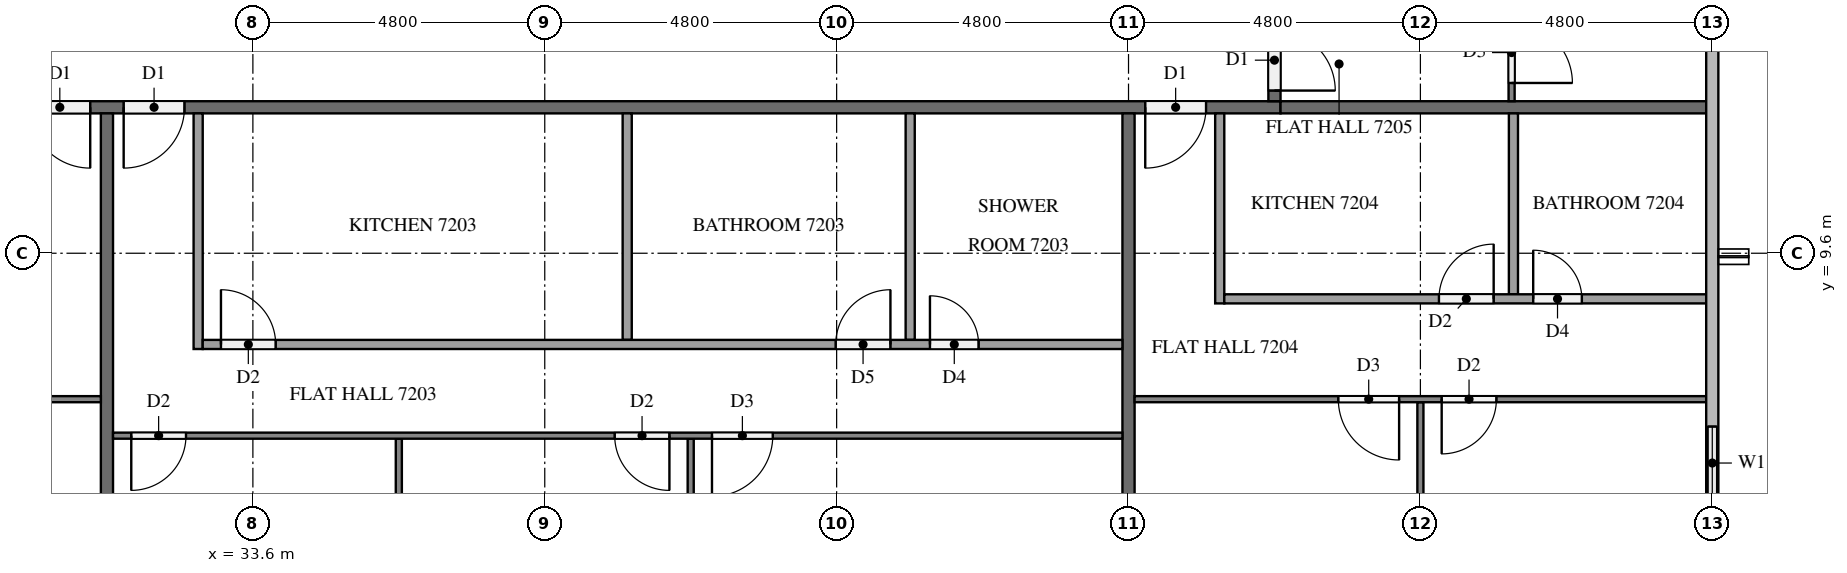
"""IFC4 building model, lengths in metres.
Left out: names, types, materials, properties, quantities, classifications, styles, units other than length and angle.
Written with IfcOpenShell. Run it as: python <this file> out.ifc"""

import sys

from ifc_helpers import new_model, si_unit, direction, frame, frame_2d, origin, place, context, subcontext, project, spatial, rectangle, extrude, element, fill, save


model = new_model("IFC4")
c1 = context("Model", 3, precision=1e-05, world=origin(), true_north=direction((0.0, 1.0)))
c2 = subcontext(c1, "Body", "Model", "MODEL_VIEW")
j1 = project(units=[si_unit("LENGTHUNIT", "METRE"), si_unit("PLANEANGLEUNIT", "RADIAN")], contexts=[c1])
p1 = place(None, origin())
s1 = spatial("IfcSite", under=j1, at=p1, CompositionType="ELEMENT")
p2 = place(p1, origin())
s2 = spatial("IfcBuilding", under=s1, at=p2, CompositionType="ELEMENT")
p3 = place(p2, frame((0.0, 0.0, 275.6)))
s3 = spatial("IfcBuildingStorey", under=s2, at=p3, CompositionType="ELEMENT", Elevation=275.6)
p4 = place(p3, frame((57.6, 5.1, 0.0), z_axis=(0.0, 0.0, 1.0), x_axis=(0.0, 1.0, 0.0)))
e1 = element("IfcWall", 1, at=p4, inside=s3, PredefinedType="SOLIDWALL", context=c2, shape_type="SweptSolid", body=[
    extrude(rectangle(XDim=2.1, YDim=0.15, at=frame_2d((1.05, 0.0))), origin(), (0.0, 0.0, 1.0), 3.2),
])
p5 = place(p4, frame((0.45, 0.0, 0.9)))
e2 = element("IfcOpeningElement", 2, at=p5, cuts=e1, PredefinedType="OPENING", context=c2, shape_type="SweptSolid", body=[
    extrude(rectangle(XDim=1.2, YDim=1.4, at=frame_2d((0.6, 0.7))), frame((0.0, 0.085, 0.0), z_axis=(0.0, -1.0, 0.0), x_axis=(1.0, 0.0, 0.0)), (0.0, 0.0, 1.0), 0.17),
])
p6 = place(p3, frame((50.5, 12.0, 0.0), z_axis=(0.0, 0.0, 1.0), x_axis=(-1.0, 0.0, 0.0)))
e3 = element("IfcWall", 3, at=p6, inside=s3, PredefinedType="PARTITIONING", context=c2, shape_type="SweptSolid", body=[
    extrude(rectangle(XDim=38.6, YDim=0.2, at=frame_2d((19.3, 0.0))), origin(), (0.0, 0.0, 1.0), 3.2),
])
p7 = place(p6, frame((31.525, 0.0, 0.0)))
e4 = element("IfcOpeningElement", 4, at=p7, cuts=e3, PredefinedType="OPENING", context=c2, shape_type="SweptSolid", body=[
    extrude(rectangle(XDim=1.1, YDim=2.1, at=frame_2d((0.55, 1.05))), frame((0.0, 0.11, 0.0), z_axis=(0.0, -1.0, 0.0), x_axis=(1.0, 0.0, 0.0)), (0.0, 0.0, 1.0), 0.22),
])
p8 = place(p6, frame((19.575, 0.0, 0.0)))
e5 = element("IfcOpeningElement", 5, at=p8, cuts=e3, PredefinedType="OPENING", context=c2, shape_type="SweptSolid", body=[
    extrude(rectangle(XDim=1.0, YDim=2.1, at=frame_2d((0.5, 1.05))), frame((0.0, 0.11, 0.0), z_axis=(0.0, -1.0, 0.0), x_axis=(1.0, 0.0, 0.0)), (0.0, 0.0, 1.0), 0.22),
])
p9 = place(p6, frame((18.025, 0.0, 0.0)))
e6 = element("IfcOpeningElement", 6, at=p9, cuts=e3, PredefinedType="OPENING", context=c2, shape_type="SweptSolid", body=[
    extrude(rectangle(XDim=1.0, YDim=2.1, at=frame_2d((0.5, 1.05))), frame((0.0, 0.11, 0.0), z_axis=(0.0, -1.0, 0.0), x_axis=(1.0, 0.0, 0.0)), (0.0, 0.0, 1.0), 0.22),
])
p10 = place(p6, frame((1.225, 0.0, 0.0)))
e7 = element("IfcOpeningElement", 7, at=p10, cuts=e3, PredefinedType="OPENING", context=c2, shape_type="SweptSolid", body=[
    extrude(rectangle(XDim=1.0, YDim=2.1, at=frame_2d((0.5, 1.05))), frame((0.0, 0.11, 0.0), z_axis=(0.0, -1.0, 0.0), x_axis=(1.0, 0.0, 0.0)), (0.0, 0.0, 1.0), 0.22),
])
p11 = place(p3, frame((50.4, 40.7, 0.0), z_axis=(0.0, 0.0, 1.0), x_axis=(0.0, -1.0, 0.0)))
e8 = element("IfcWall", 8, at=p11, inside=s3, PredefinedType="PARTITIONING", context=c2, shape_type="SweptSolid", body=[
    extrude(rectangle(XDim=28.6, YDim=0.2, at=frame_2d((14.3, 0.0))), origin(), (0.0, 0.0, 1.0), 3.2),
])
p12 = place(p11, frame((27.425, 0.0, 0.0)))
e9 = element("IfcOpeningElement", 9, at=p12, cuts=e8, PredefinedType="OPENING", context=c2, shape_type="SweptSolid", body=[
    extrude(rectangle(XDim=1.0, YDim=2.1, at=frame_2d((0.5, 1.05))), frame((0.0, 0.11, 0.0), z_axis=(0.0, -1.0, 0.0), x_axis=(1.0, 0.0, 0.0)), (0.0, 0.0, 1.0), 0.22),
])
p13 = place(p11, frame((0.175, 0.0, 0.0)))
e10 = element("IfcOpeningElement", 10, at=p13, cuts=e8, PredefinedType="OPENING", context=c2, shape_type="SweptSolid", body=[
    extrude(rectangle(XDim=1.0, YDim=2.1, at=frame_2d((0.5, 1.05))), frame((0.0, 0.11, 0.0), z_axis=(0.0, -1.0, 0.0), x_axis=(1.0, 0.0, 0.0)), (0.0, 0.0, 1.0), 0.22),
])
for number, where, z_axis, x_axis in (
    (11, (31.2, 11.9, 0.0), (0.0, 0.0, 1.0), (0.0, -1.0, 0.0)),
    (12, (48.0, 11.9, 0.0), (0.0, 0.0, 1.0), (0.0, -1.0, 0.0)),
):
    element("IfcWall", number, at=place(p3, frame(where, z_axis=z_axis, x_axis=x_axis)), inside=s3, PredefinedType="PARTITIONING", context=c2, shape_type="SweptSolid", body=[
        extrude(rectangle(XDim=11.8, YDim=0.2, at=frame_2d((5.9, 0.0))), origin(), (0.0, 0.0, 1.0), 3.2),
    ])
p14 = place(p3, frame((50.5, 12.0, 0.0), z_axis=(0.0, 0.0, 1.0), x_axis=(1.0, 0.0, 0.0)))
e13 = element("IfcWall", 13, at=p14, inside=s3, PredefinedType="PARTITIONING", context=c2, shape_type="SweptSolid", body=[
    extrude(rectangle(XDim=7.0, YDim=0.2, at=frame_2d((3.5, 0.0))), origin(), (0.0, 0.0, 1.0), 3.2),
])
p15 = place(p3, frame((31.1, 7.2, 0.0), z_axis=(0.0, 0.0, 1.0), x_axis=(-1.0, 0.0, 0.0)))
e14 = element("IfcWall", 14, at=p15, inside=s3, PredefinedType="PARTITIONING", context=c2, shape_type="SweptSolid", body=[
    extrude(rectangle(XDim=11.8, YDim=0.1, at=frame_2d((5.9, 0.0))), origin(), (0.0, 0.0, 1.0), 3.2),
])
p16 = place(p15, frame((3.45, 0.0, 0.0)))
e15 = element("IfcOpeningElement", 15, at=p16, cuts=e14, PredefinedType="OPENING", context=c2, shape_type="SweptSolid", body=[
    extrude(rectangle(XDim=0.9, YDim=2.1, at=frame_2d((0.45, 1.05))), frame((0.0, 0.06, 0.0), z_axis=(0.0, -1.0, 0.0), x_axis=(1.0, 0.0, 0.0)), (0.0, 0.0, 1.0), 0.12),
])
p17 = place(p15, frame((5.05, 0.0, 0.0)))
e16 = element("IfcOpeningElement", 16, at=p17, cuts=e14, PredefinedType="OPENING", context=c2, shape_type="SweptSolid", body=[
    extrude(rectangle(XDim=1.0, YDim=2.1, at=frame_2d((0.5, 1.05))), frame((0.0, 0.06, 0.0), z_axis=(0.0, -1.0, 0.0), x_axis=(1.0, 0.0, 0.0)), (0.0, 0.0, 1.0), 0.12),
])
for number, where, z_axis, x_axis in (
    (17, (36.0, 6.55, 0.0), (0.0, 0.0, 1.0), (0.0, -1.0, 0.0)),
    (18, (40.8, 6.55, 0.0), (0.0, 0.0, 1.0), (0.0, -1.0, 0.0)),
):
    element("IfcWall", number, at=place(p3, frame(where, z_axis=z_axis, x_axis=x_axis)), inside=s3, PredefinedType="PARTITIONING", context=c2, shape_type="SweptSolid", body=[
        extrude(rectangle(XDim=6.45, YDim=0.1, at=frame_2d((3.225, 0.0))), origin(), (0.0, 0.0, 1.0), 3.2),
    ])
p18 = place(p3, frame((47.9, 6.6, 0.0), z_axis=(0.0, 0.0, 1.0), x_axis=(-1.0, 0.0, 0.0)))
e19 = element("IfcWall", 19, at=p18, inside=s3, PredefinedType="PARTITIONING", context=c2, shape_type="SweptSolid", body=[
    extrude(rectangle(XDim=16.6, YDim=0.1, at=frame_2d((8.3, 0.0))), origin(), (0.0, 0.0, 1.0), 3.2),
])
p19 = place(p18, frame((15.4, 0.0, 0.0)))
e20 = element("IfcOpeningElement", 20, at=p19, cuts=e19, PredefinedType="OPENING", context=c2, shape_type="SweptSolid", body=[
    extrude(rectangle(XDim=0.9, YDim=2.1, at=frame_2d((0.45, 1.05))), frame((0.0, 0.06, 0.0), z_axis=(0.0, -1.0, 0.0), x_axis=(1.0, 0.0, 0.0)), (0.0, 0.0, 1.0), 0.12),
])
p20 = place(p18, frame((7.45, 0.0, 0.0)))
e21 = element("IfcOpeningElement", 21, at=p20, cuts=e19, PredefinedType="OPENING", context=c2, shape_type="SweptSolid", body=[
    extrude(rectangle(XDim=0.9, YDim=2.1, at=frame_2d((0.45, 1.05))), frame((0.0, 0.06, 0.0), z_axis=(0.0, -1.0, 0.0), x_axis=(1.0, 0.0, 0.0)), (0.0, 0.0, 1.0), 0.12),
])
p21 = place(p18, frame((5.75, 0.0, 0.0)))
e22 = element("IfcOpeningElement", 22, at=p21, cuts=e19, PredefinedType="OPENING", context=c2, shape_type="SweptSolid", body=[
    extrude(rectangle(XDim=1.0, YDim=2.1, at=frame_2d((0.5, 1.05))), frame((0.0, 0.06, 0.0), z_axis=(0.0, -1.0, 0.0), x_axis=(1.0, 0.0, 0.0)), (0.0, 0.0, 1.0), 0.12),
])
for number, where, z_axis, x_axis in (
    (23, (39.756, 11.9, 0.0), (0.0, 0.0, 1.0), (0.0, -1.0, 0.0)),
    (24, (44.41, 11.9, 0.0), (0.0, 0.0, 1.0), (0.0, -1.0, 0.0)),
):
    element("IfcWall", number, at=place(p3, frame(where, z_axis=z_axis, x_axis=x_axis)), inside=s3, PredefinedType="PARTITIONING", context=c2, shape_type="SweptSolid", body=[
        extrude(rectangle(XDim=3.725, YDim=0.15, at=frame_2d((1.862, 0.0))), origin(), (0.0, 0.0, 1.0), 3.2),
    ])
p22 = place(p3, frame((32.7, 11.9, 0.0), z_axis=(0.0, 0.0, 1.0), x_axis=(0.0, -1.0, 0.0)))
e25 = element("IfcWall", 25, at=p22, inside=s3, PredefinedType="PARTITIONING", context=c2, shape_type="SweptSolid", body=[
    extrude(rectangle(XDim=3.875, YDim=0.15, at=frame_2d((1.938, 0.0))), origin(), (0.0, 0.0, 1.0), 3.2),
])
p23 = place(p3, frame((32.775, 8.1, 0.0), z_axis=(0.0, 0.0, 1.0), x_axis=(1.0, 0.0, 0.0)))
e26 = element("IfcWall", 26, at=p23, inside=s3, PredefinedType="PARTITIONING", context=c2, shape_type="SweptSolid", body=[
    extrude(rectangle(XDim=15.125, YDim=0.15, at=frame_2d((7.562, 0.0))), origin(), (0.0, 0.0, 1.0), 3.2),
])
p24 = place(p23, frame((0.3, 0.0, 0.0)))
e27 = element("IfcOpeningElement", 27, at=p24, cuts=e26, PredefinedType="OPENING", context=c2, shape_type="SweptSolid", body=[
    extrude(rectangle(XDim=0.9, YDim=2.1, at=frame_2d((0.45, 1.05))), frame((0.0, 0.085, 0.0), z_axis=(0.0, -1.0, 0.0), x_axis=(1.0, 0.0, 0.0)), (0.0, 0.0, 1.0), 0.17),
])
p25 = place(p23, frame((10.41, 0.0, 0.0)))
e28 = element("IfcOpeningElement", 28, at=p25, cuts=e26, PredefinedType="OPENING", context=c2, shape_type="SweptSolid", body=[
    extrude(rectangle(XDim=0.9, YDim=2.1, at=frame_2d((0.45, 1.05))), frame((0.0, 0.085, 0.0), z_axis=(0.0, -1.0, 0.0), x_axis=(1.0, 0.0, 0.0)), (0.0, 0.0, 1.0), 0.17),
])
p26 = place(p23, frame((11.96, 0.0, 0.0)))
e29 = element("IfcOpeningElement", 29, at=p26, cuts=e26, PredefinedType="OPENING", context=c2, shape_type="SweptSolid", body=[
    extrude(rectangle(XDim=0.8, YDim=2.1, at=frame_2d((0.4, 1.05))), frame((0.0, 0.085, 0.0), z_axis=(0.0, -1.0, 0.0), x_axis=(1.0, 0.0, 0.0)), (0.0, 0.0, 1.0), 0.17),
])
p27 = place(p3, frame((52.8, 7.15, 0.0), z_axis=(0.0, 0.0, 1.0), x_axis=(0.0, -1.0, 0.0)))
e30 = element("IfcWall", 30, at=p27, inside=s3, PredefinedType="PARTITIONING", context=c2, shape_type="SweptSolid", body=[
    extrude(rectangle(XDim=6.85, YDim=0.1, at=frame_2d((3.425, 0.0))), origin(), (0.0, 0.0, 1.0), 3.2),
])
p28 = place(p3, frame((57.5, 7.2, 0.0), z_axis=(0.0, 0.0, 1.0), x_axis=(-1.0, 0.0, 0.0)))
e31 = element("IfcWall", 31, at=p28, inside=s3, PredefinedType="PARTITIONING", context=c2, shape_type="SweptSolid", body=[
    extrude(rectangle(XDim=9.4, YDim=0.1, at=frame_2d((4.7, 0.0))), origin(), (0.0, 0.0, 1.0), 3.2),
])
p29 = place(p28, frame((5.05, 0.0, 0.0)))
e32 = element("IfcOpeningElement", 32, at=p29, cuts=e31, PredefinedType="OPENING", context=c2, shape_type="SweptSolid", body=[
    extrude(rectangle(XDim=1.0, YDim=2.1, at=frame_2d((0.5, 1.05))), frame((0.0, 0.06, 0.0), z_axis=(0.0, -1.0, 0.0), x_axis=(1.0, 0.0, 0.0)), (0.0, 0.0, 1.0), 0.12),
])
p30 = place(p28, frame((3.45, 0.0, 0.0)))
e33 = element("IfcOpeningElement", 33, at=p30, cuts=e31, PredefinedType="OPENING", context=c2, shape_type="SweptSolid", body=[
    extrude(rectangle(XDim=0.9, YDim=2.1, at=frame_2d((0.45, 1.05))), frame((0.0, 0.06, 0.0), z_axis=(0.0, -1.0, 0.0), x_axis=(1.0, 0.0, 0.0)), (0.0, 0.0, 1.0), 0.12),
])
p31 = place(p3, frame((54.33, 11.9, 0.0), z_axis=(0.0, 0.0, 1.0), x_axis=(0.0, -1.0, 0.0)))
e34 = element("IfcWall", 34, at=p31, inside=s3, PredefinedType="PARTITIONING", context=c2, shape_type="SweptSolid", body=[
    extrude(rectangle(XDim=2.975, YDim=0.15, at=frame_2d((1.487, 0.0))), origin(), (0.0, 0.0, 1.0), 3.2),
])
p32 = place(p3, frame((49.5, 11.9, 0.0), z_axis=(0.0, 0.0, 1.0), x_axis=(0.0, -1.0, 0.0)))
e35 = element("IfcWall", 35, at=p32, inside=s3, PredefinedType="PARTITIONING", context=c2, shape_type="SweptSolid", body=[
    extrude(rectangle(XDim=3.125, YDim=0.15, at=frame_2d((1.562, 0.0))), origin(), (0.0, 0.0, 1.0), 3.2),
])
p33 = place(p3, frame((49.575, 8.85, 0.0), z_axis=(0.0, 0.0, 1.0), x_axis=(1.0, 0.0, 0.0)))
e36 = element("IfcWall", 36, at=p33, inside=s3, PredefinedType="PARTITIONING", context=c2, shape_type="SweptSolid", body=[
    extrude(rectangle(XDim=7.925, YDim=0.15, at=frame_2d((3.962, 0.0))), origin(), (0.0, 0.0, 1.0), 3.2),
])
p34 = place(p33, frame((3.53, 0.0, 0.0)))
e37 = element("IfcOpeningElement", 37, at=p34, cuts=e36, PredefinedType="OPENING", context=c2, shape_type="SweptSolid", body=[
    extrude(rectangle(XDim=0.9, YDim=2.1, at=frame_2d((0.45, 1.05))), frame((0.0, 0.085, 0.0), z_axis=(0.0, -1.0, 0.0), x_axis=(1.0, 0.0, 0.0)), (0.0, 0.0, 1.0), 0.17),
])
p35 = place(p33, frame((5.08, 0.0, 0.0)))
e38 = element("IfcOpeningElement", 38, at=p35, cuts=e36, PredefinedType="OPENING", context=c2, shape_type="SweptSolid", body=[
    extrude(rectangle(XDim=0.8, YDim=2.1, at=frame_2d((0.4, 1.05))), frame((0.0, 0.085, 0.0), z_axis=(0.0, -1.0, 0.0), x_axis=(1.0, 0.0, 0.0)), (0.0, 0.0, 1.0), 0.17),
])
p36 = place(p3, frame((54.3, 28.7, 0.0), z_axis=(0.0, 0.0, 1.0), x_axis=(0.0, -1.0, 0.0)))
e39 = element("IfcWall", 39, at=p36, inside=s3, PredefinedType="PARTITIONING", context=c2, shape_type="SweptSolid", body=[
    extrude(rectangle(XDim=16.6, YDim=0.1, at=frame_2d((8.3, 0.0))), origin(), (0.0, 0.0, 1.0), 3.2),
])
p37 = place(p36, frame((15.3, 0.0, 0.0)))
e40 = element("IfcOpeningElement", 40, at=p37, cuts=e39, PredefinedType="OPENING", context=c2, shape_type="SweptSolid", body=[
    extrude(rectangle(XDim=1.0, YDim=2.1, at=frame_2d((0.5, 1.05))), frame((0.0, 0.06, 0.0), z_axis=(0.0, -1.0, 0.0), x_axis=(1.0, 0.0, 0.0)), (0.0, 0.0, 1.0), 0.12),
])
p38 = place(p36, frame((5.05, 0.0, 0.0)))
e41 = element("IfcOpeningElement", 41, at=p38, cuts=e39, PredefinedType="OPENING", context=c2, shape_type="SweptSolid", body=[
    extrude(rectangle(XDim=0.9, YDim=2.1, at=frame_2d((0.45, 1.05))), frame((0.0, 0.06, 0.0), z_axis=(0.0, -1.0, 0.0), x_axis=(1.0, 0.0, 0.0)), (0.0, 0.0, 1.0), 0.12),
])
p39 = place(p36, frame((3.45, 0.0, 0.0)))
e42 = element("IfcOpeningElement", 42, at=p39, cuts=e39, PredefinedType="OPENING", context=c2, shape_type="SweptSolid", body=[
    extrude(rectangle(XDim=0.9, YDim=2.1, at=frame_2d((0.45, 1.05))), frame((0.0, 0.06, 0.0), z_axis=(0.0, -1.0, 0.0), x_axis=(1.0, 0.0, 0.0)), (0.0, 0.0, 1.0), 0.12),
])
p40 = place(p5, origin())
e43 = element("IfcWindow", 43, at=p40, inside=s3, PartitioningType="SINGLE_PANEL", PredefinedType="WINDOW", context=c2, shape_type="SweptSolid", body=[
    extrude(rectangle(XDim=1.2, YDim=1.4, at=frame_2d((0.6, 0.7))), frame((0.0, 0.03, 0.0), z_axis=(0.0, -1.0, 0.0), x_axis=(1.0, 0.0, 0.0)), (0.0, 0.0, 1.0), 0.06),
])
fill(e2, e43)
p41 = place(p8, origin())
e44 = element("IfcDoor", 44, at=p41, inside=s3, OperationType="SINGLE_SWING_LEFT", PredefinedType="DOOR", context=c2, shape_type="SweptSolid", body=[
    extrude(rectangle(XDim=1.0, YDim=2.1, at=frame_2d((0.5, 1.05))), frame((0.0, 0.025, 0.0), z_axis=(0.0, -1.0, 0.0), x_axis=(1.0, 0.0, 0.0)), (0.0, 0.0, 1.0), 0.05),
])
fill(e5, e44)
p42 = place(p9, origin())
e45 = element("IfcDoor", 45, at=p42, inside=s3, OperationType="SINGLE_SWING_RIGHT", PredefinedType="DOOR", context=c2, shape_type="SweptSolid", body=[
    extrude(rectangle(XDim=1.0, YDim=2.1, at=frame_2d((0.5, 1.05))), frame((0.0, 0.025, 0.0), z_axis=(0.0, -1.0, 0.0), x_axis=(1.0, 0.0, 0.0)), (0.0, 0.0, 1.0), 0.05),
])
fill(e6, e45)
p43 = place(p10, origin())
e46 = element("IfcDoor", 46, at=p43, inside=s3, OperationType="SINGLE_SWING_RIGHT", PredefinedType="DOOR", context=c2, shape_type="SweptSolid", body=[
    extrude(rectangle(XDim=1.0, YDim=2.1, at=frame_2d((0.5, 1.05))), frame((0.0, 0.025, 0.0), z_axis=(0.0, -1.0, 0.0), x_axis=(1.0, 0.0, 0.0)), (0.0, 0.0, 1.0), 0.05),
])
fill(e7, e46)
p44 = place(p12, origin())
e47 = element("IfcDoor", 47, at=p44, inside=s3, OperationType="SINGLE_SWING_RIGHT", PredefinedType="DOOR", context=c2, shape_type="SweptSolid", body=[
    extrude(rectangle(XDim=1.0, YDim=2.1, at=frame_2d((0.5, 1.05))), frame((0.0, 0.025, 0.0), z_axis=(0.0, -1.0, 0.0), x_axis=(1.0, 0.0, 0.0)), (0.0, 0.0, 1.0), 0.05),
])
fill(e9, e47)
p45 = place(p19, origin())
e48 = element("IfcDoor", 48, at=p45, inside=s3, OperationType="SINGLE_SWING_RIGHT", PredefinedType="DOOR", context=c2, shape_type="SweptSolid", body=[
    extrude(rectangle(XDim=0.9, YDim=2.1, at=frame_2d((0.45, 1.05))), frame((0.0, 0.025, 0.0), z_axis=(0.0, -1.0, 0.0), x_axis=(1.0, 0.0, 0.0)), (0.0, 0.0, 1.0), 0.05),
])
fill(e20, e48)
p46 = place(p20, origin())
e49 = element("IfcDoor", 49, at=p46, inside=s3, OperationType="SINGLE_SWING_LEFT", PredefinedType="DOOR", context=c2, shape_type="SweptSolid", body=[
    extrude(rectangle(XDim=0.9, YDim=2.1, at=frame_2d((0.45, 1.05))), frame((0.0, 0.025, 0.0), z_axis=(0.0, -1.0, 0.0), x_axis=(1.0, 0.0, 0.0)), (0.0, 0.0, 1.0), 0.05),
])
fill(e21, e49)
p47 = place(p21, origin())
e50 = element("IfcDoor", 50, at=p47, inside=s3, OperationType="SINGLE_SWING_RIGHT", PredefinedType="DOOR", context=c2, shape_type="SweptSolid", body=[
    extrude(rectangle(XDim=1.0, YDim=2.1, at=frame_2d((0.5, 1.05))), frame((0.0, 0.025, 0.0), z_axis=(0.0, -1.0, 0.0), x_axis=(1.0, 0.0, 0.0)), (0.0, 0.0, 1.0), 0.05),
])
fill(e22, e50)
p48 = place(p24, origin())
e51 = element("IfcDoor", 51, at=p48, inside=s3, OperationType="SINGLE_SWING_LEFT", PredefinedType="DOOR", context=c2, shape_type="SweptSolid", body=[
    extrude(rectangle(XDim=0.9, YDim=2.1, at=frame_2d((0.45, 1.05))), frame((0.0, 0.025, 0.0), z_axis=(0.0, -1.0, 0.0), x_axis=(1.0, 0.0, 0.0)), (0.0, 0.0, 1.0), 0.05),
])
fill(e27, e51)
p49 = place(p25, origin())
e52 = element("IfcDoor", 52, at=p49, inside=s3, OperationType="SINGLE_SWING_RIGHT", PredefinedType="DOOR", context=c2, shape_type="SweptSolid", body=[
    extrude(rectangle(XDim=0.9, YDim=2.1, at=frame_2d((0.45, 1.05))), frame((0.0, 0.025, 0.0), z_axis=(0.0, -1.0, 0.0), x_axis=(1.0, 0.0, 0.0)), (0.0, 0.0, 1.0), 0.05),
])
fill(e28, e52)
p50 = place(p26, origin())
e53 = element("IfcDoor", 53, at=p50, inside=s3, OperationType="SINGLE_SWING_LEFT", PredefinedType="DOOR", context=c2, shape_type="SweptSolid", body=[
    extrude(rectangle(XDim=0.8, YDim=2.1, at=frame_2d((0.4, 1.05))), frame((0.0, 0.025, 0.0), z_axis=(0.0, -1.0, 0.0), x_axis=(1.0, 0.0, 0.0)), (0.0, 0.0, 1.0), 0.05),
])
fill(e29, e53)
p51 = place(p29, origin())
e54 = element("IfcDoor", 54, at=p51, inside=s3, OperationType="SINGLE_SWING_LEFT", PredefinedType="DOOR", context=c2, shape_type="SweptSolid", body=[
    extrude(rectangle(XDim=1.0, YDim=2.1, at=frame_2d((0.5, 1.05))), frame((0.0, 0.025, 0.0), z_axis=(0.0, -1.0, 0.0), x_axis=(1.0, 0.0, 0.0)), (0.0, 0.0, 1.0), 0.05),
])
fill(e32, e54)
p52 = place(p30, origin())
e55 = element("IfcDoor", 55, at=p52, inside=s3, OperationType="SINGLE_SWING_RIGHT", PredefinedType="DOOR", context=c2, shape_type="SweptSolid", body=[
    extrude(rectangle(XDim=0.9, YDim=2.1, at=frame_2d((0.45, 1.05))), frame((0.0, 0.025, 0.0), z_axis=(0.0, -1.0, 0.0), x_axis=(1.0, 0.0, 0.0)), (0.0, 0.0, 1.0), 0.05),
])
fill(e33, e55)
p53 = place(p34, origin())
e56 = element("IfcDoor", 56, at=p53, inside=s3, OperationType="SINGLE_SWING_RIGHT", PredefinedType="DOOR", context=c2, shape_type="SweptSolid", body=[
    extrude(rectangle(XDim=0.9, YDim=2.1, at=frame_2d((0.45, 1.05))), frame((0.0, 0.025, 0.0), z_axis=(0.0, -1.0, 0.0), x_axis=(1.0, 0.0, 0.0)), (0.0, 0.0, 1.0), 0.05),
])
fill(e37, e56)
p54 = place(p35, origin())
e57 = element("IfcDoor", 57, at=p54, inside=s3, OperationType="SINGLE_SWING_LEFT", PredefinedType="DOOR", context=c2, shape_type="SweptSolid", body=[
    extrude(rectangle(XDim=0.8, YDim=2.1, at=frame_2d((0.4, 1.05))), frame((0.0, 0.025, 0.0), z_axis=(0.0, -1.0, 0.0), x_axis=(1.0, 0.0, 0.0)), (0.0, 0.0, 1.0), 0.05),
])
fill(e38, e57)
p55 = place(p37, origin())
e58 = element("IfcDoor", 58, at=p55, inside=s3, OperationType="SINGLE_SWING_RIGHT", PredefinedType="DOOR", context=c2, shape_type="SweptSolid", body=[
    extrude(rectangle(XDim=1.0, YDim=2.1, at=frame_2d((0.5, 1.05))), frame((0.0, 0.025, 0.0), z_axis=(0.0, -1.0, 0.0), x_axis=(1.0, 0.0, 0.0)), (0.0, 0.0, 1.0), 0.05),
])
fill(e40, e58)
save(model, sys.argv[1])
